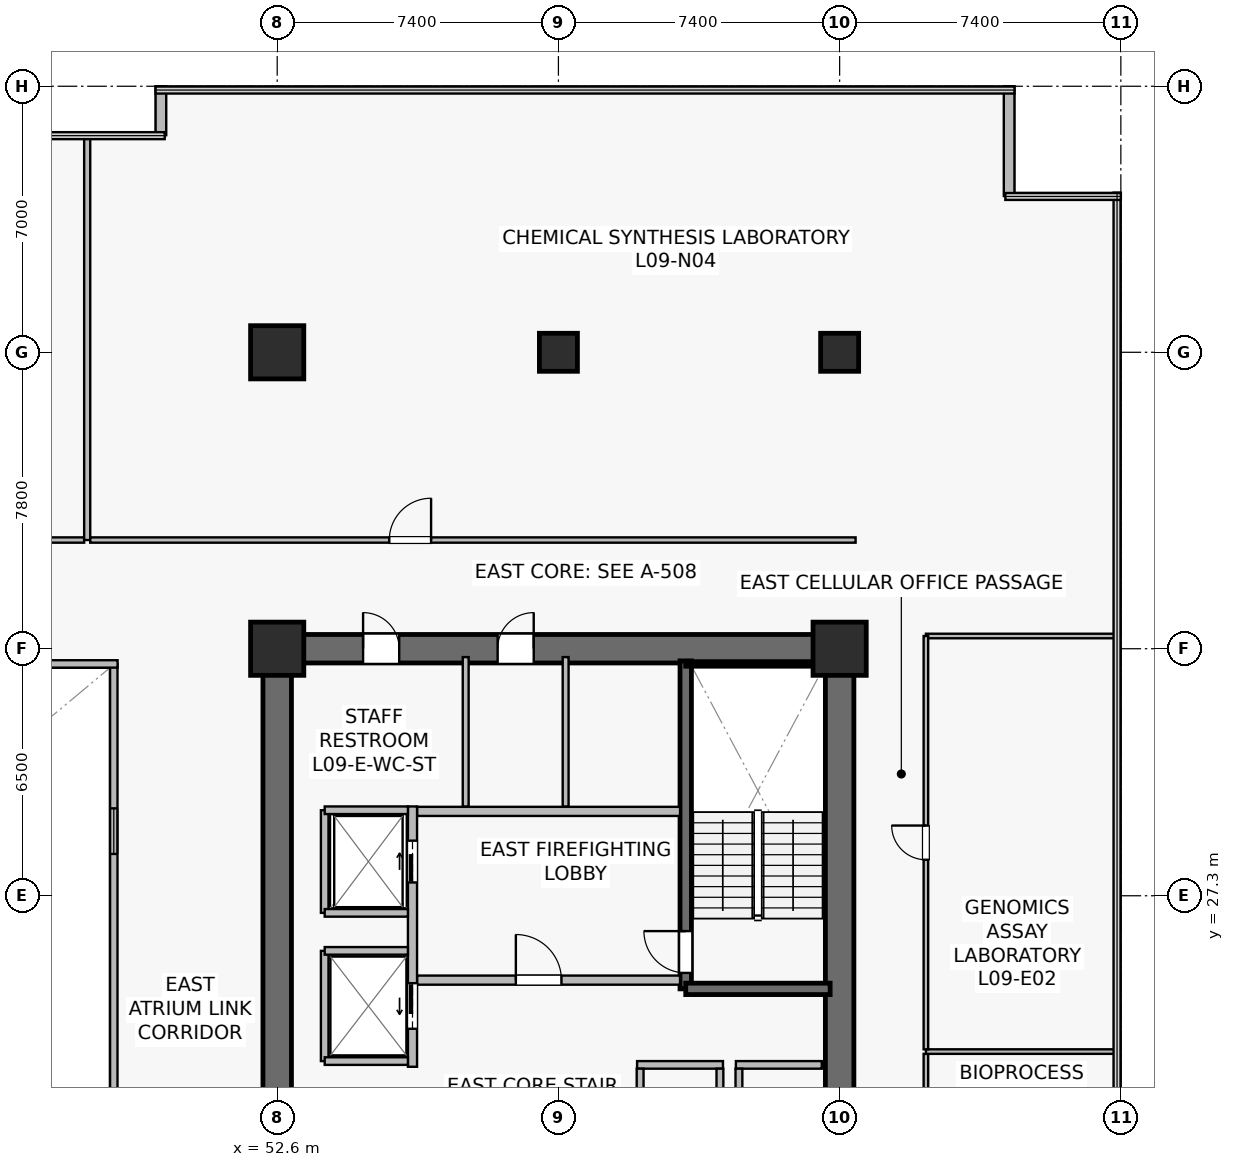
"""IFC4 building model, lengths in metres.
Left out: names, types, materials, properties, quantities, classifications, styles, units other than length and angle.
Written with IfcOpenShell. Run it as: python <this file> out.ifc"""

import sys

from ifc_helpers import new_model, si_unit, direction, frame, frame_2d, origin, origin_2d, place, context, subcontext, project, spatial, rectangle, extrude, source, transform, mapped, element, fill, save


model = new_model("IFC4")
c1 = context("Model", 3, precision=1e-05, world=origin(), true_north=direction((0.0, 1.0)))
c2 = subcontext(c1, "Body", "Model", "MODEL_VIEW")
j1 = project(units=[si_unit("LENGTHUNIT", "METRE"), si_unit("PLANEANGLEUNIT", "RADIAN")], contexts=[c1])
p1 = place(None, origin())
s1 = spatial("IfcSite", under=j1, at=p1, CompositionType="ELEMENT")
p2 = place(p1, origin())
s2 = spatial("IfcBuilding", under=s1, at=p2, CompositionType="ELEMENT")
p3 = place(p2, frame((0.0, 0.0, 37.5)))
s3 = spatial("IfcBuildingStorey", under=s2, at=p3, CompositionType="ELEMENT", Elevation=37.5)
p4 = place(p3, frame((52.225, 33.8, 0.0), z_axis=(0.0, 0.0, 1.0), x_axis=(1.0, 0.0, 0.0)))
e1 = element("IfcWall", 1, at=p4, inside=s3, PredefinedType="SHEAR", context=c2, shape_type="SweptSolid", body=[
    extrude(rectangle(XDim=15.55, YDim=0.75, at=frame_2d((7.775, 0.0))), origin(), (0.0, 0.0, 1.0), 3.78),
])
p5 = place(p4, frame((6.175, 0.0, 0.0)))
e2 = element("IfcOpeningElement", 2, at=p5, cuts=e1, PredefinedType="OPENING", context=c2, shape_type="SweptSolid", body=[
    extrude(rectangle(XDim=0.95, YDim=2.15, at=frame_2d((0.475, 1.075))), frame((0.0, 0.385, 0.0), z_axis=(0.0, -1.0, 0.0), x_axis=(1.0, 0.0, 0.0)), (0.0, 0.0, 1.0), 0.77),
])
p6 = place(p4, frame((2.635, 0.0, 0.0)))
e3 = element("IfcOpeningElement", 3, at=p6, cuts=e1, PredefinedType="OPENING", context=c2, shape_type="SweptSolid", body=[
    extrude(rectangle(XDim=0.95, YDim=2.15, at=frame_2d((0.475, 1.075))), frame((0.0, 0.385, 0.0), z_axis=(0.0, -1.0, 0.0), x_axis=(1.0, 0.0, 0.0)), (0.0, 0.0, 1.0), 0.77),
])
p7 = place(p3, frame((52.6, 15.175, 0.0), z_axis=(0.0, 0.0, 1.0), x_axis=(0.0, 1.0, 0.0)))
e4 = element("IfcWall", 4, at=p7, inside=s3, PredefinedType="SHEAR", context=c2, shape_type="SweptSolid", body=[
    extrude(rectangle(XDim=18.25, YDim=0.75, at=frame_2d((9.125, 0.0))), origin(), (0.0, 0.0, 1.0), 3.78),
])
p8 = place(p7, frame((3.375, 0.0, 0.0)))
e5 = element("IfcOpeningElement", 5, at=p8, cuts=e4, PredefinedType="OPENING", context=c2, shape_type="SweptSolid", body=[
    extrude(rectangle(XDim=1.42, YDim=2.2, at=frame_2d((0.71, 1.1))), frame((0.0, 0.385, 0.0), z_axis=(0.0, -1.0, 0.0), x_axis=(1.0, 0.0, 0.0)), (0.0, 0.0, 1.0), 0.77),
])
p9 = place(p3, frame((67.4, 15.175, 0.0), z_axis=(0.0, 0.0, 1.0), x_axis=(0.0, 1.0, 0.0)))
e6 = element("IfcWall", 6, at=p9, inside=s3, PredefinedType="SHEAR", context=c2, shape_type="SweptSolid", body=[
    extrude(rectangle(XDim=18.25, YDim=0.75, at=frame_2d((9.125, 0.0))), origin(), (0.0, 0.0, 1.0), 3.78),
])
p10 = place(p3, frame((63.35, 24.85, 0.0), z_axis=(0.0, 0.0, 1.0), x_axis=(0.0, 1.0, 0.0)))
e7 = element("IfcWall", 7, at=p10, inside=s3, PredefinedType="SHEAR", context=c2, shape_type="SweptSolid", body=[
    extrude(rectangle(XDim=8.63, YDim=0.3, at=frame_2d((4.315, 0.0))), origin(), (0.0, 0.0, 1.0), 3.78),
])
p11 = place(p10, frame((0.42, 0.0, 0.0)))
e8 = element("IfcOpeningElement", 8, at=p11, cuts=e7, PredefinedType="OPENING", context=c2, shape_type="SweptSolid", body=[
    extrude(rectangle(XDim=1.1, YDim=2.15, at=frame_2d((0.55, 1.075))), frame((0.0, 0.16, 0.0), z_axis=(0.0, -1.0, 0.0), x_axis=(1.0, 0.0, 0.0)), (0.0, 0.0, 1.0), 0.32),
])
p12 = place(p3, frame((63.35, 24.85, 0.0), z_axis=(0.0, 0.0, 1.0), x_axis=(1.0, 0.0, 0.0)))
e9 = element("IfcWall", 9, at=p12, inside=s3, PredefinedType="SHEAR", context=c2, shape_type="SweptSolid", body=[
    extrude(rectangle(XDim=3.8, YDim=0.3, at=frame_2d((1.9, 0.0))), origin(), (0.0, 0.0, 1.0), 3.78),
])
p13 = place(p3, frame((63.35, 33.4, 0.0), z_axis=(0.0, 0.0, 1.0), x_axis=(1.0, 0.0, 0.0)))
e10 = element("IfcWall", 10, at=p13, inside=s3, PredefinedType="SOLIDWALL", context=c2, shape_type="SweptSolid", body=[
    extrude(rectangle(XDim=3.72, YDim=0.12, at=frame_2d((1.86, 0.0))), origin(), (0.0, 0.0, 1.0), 3.78),
])
m1 = source(origin(), c2, "Body", "SweptSolid", [
    extrude(rectangle(XDim=1.4, YDim=1.4, at=origin_2d()), origin(), (0.0, 0.0, 1.0), 4.1),
])
for number, where, z_axis, x_axis in (
    (11, (52.6, 33.8, 0.0), (0.0, 0.0, 1.0), (1.0, 0.0, 0.0)),
    (12, (67.4, 33.8, 0.0), (0.0, 0.0, 1.0), (1.0, 0.0, 0.0)),
    (13, (52.6, 41.6, 0.0), (0.0, 0.0, 1.0), (1.0, 0.0, 0.0)),
):
    element("IfcColumn", number, at=place(p3, frame(where, z_axis=z_axis, x_axis=x_axis)), inside=s3, PredefinedType="COLUMN", context=c2, shape_type="MappedRepresentation", body=[
        mapped(m1, transform((0.0, 0.0, 0.0), scale=1.0)),
    ])
m2 = source(origin(), c2, "Body", "SweptSolid", [
    extrude(rectangle(XDim=1.0, YDim=1.0, at=origin_2d()), origin(), (0.0, 0.0, 1.0), 4.1),
])
for number, where, z_axis, x_axis in (
    (14, (60.0, 41.6, 0.0), (0.0, 0.0, 1.0), (1.0, 0.0, 0.0)),
    (15, (67.4, 41.6, 0.0), (0.0, 0.0, 1.0), (1.0, 0.0, 0.0)),
):
    element("IfcColumn", number, at=place(p3, frame(where, z_axis=z_axis, x_axis=x_axis)), inside=s3, PredefinedType="COLUMN", context=c2, shape_type="MappedRepresentation", body=[
        mapped(m2, transform((0.0, 0.0, 0.0), scale=1.0)),
    ])
p14 = place(p3, frame((71.86, 45.712, 0.0), z_axis=(0.0, 0.0, 1.0), x_axis=(0.0, 1.0, 0.0)))
e16 = element("IfcWall", 16, at=p14, inside=s3, PredefinedType="STANDARD", context=c2, shape_type="SweptSolid", body=[
    extrude(rectangle(XDim=2.888, YDim=0.28, at=frame_2d((1.444, 0.0))), origin(), (0.0, 0.0, 1.0), 3.78),
])
p15 = place(p3, frame((49.54, 48.6, 0.0), z_axis=(0.0, 0.0, 1.0), x_axis=(0.0, -1.0, 0.0)))
e17 = element("IfcWall", 17, at=p15, inside=s3, PredefinedType="STANDARD", context=c2, shape_type="SweptSolid", body=[
    extrude(rectangle(XDim=1.288, YDim=0.28, at=frame_2d((0.644, 0.0))), origin(), (0.0, 0.0, 1.0), 3.78),
])
p16 = place(p3, frame((56.28, 25.08, 0.0), z_axis=(0.0, 0.0, 1.0), x_axis=(1.0, 0.0, 0.0)))
e18 = element("IfcWall", 18, at=p16, inside=s3, PredefinedType="SOLIDWALL", context=c2, shape_type="SweptSolid", body=[
    extrude(rectangle(XDim=6.92, YDim=0.24, at=frame_2d((3.46, 0.0))), origin(), (0.0, 0.0, 1.0), 3.065),
])
p17 = place(p16, frame((2.6, 0.0, 0.0)))
e19 = element("IfcOpeningElement", 19, at=p17, cuts=e18, PredefinedType="OPENING", context=c2, shape_type="SweptSolid", body=[
    extrude(rectangle(XDim=1.2, YDim=2.16, at=frame_2d((0.6, 1.08))), frame((0.0, 0.13, 0.0), z_axis=(0.0, -1.0, 0.0), x_axis=(1.0, 0.0, 0.0)), (0.0, 0.0, 1.0), 0.26),
])
p18 = place(p3, frame((56.28, 29.52, 0.0), z_axis=(0.0, 0.0, 1.0), x_axis=(1.0, 0.0, 0.0)))
e20 = element("IfcWall", 20, at=p18, inside=s3, PredefinedType="SOLIDWALL", context=c2, shape_type="SweptSolid", body=[
    extrude(rectangle(XDim=6.92, YDim=0.24, at=frame_2d((3.46, 0.0))), origin(), (0.0, 0.0, 1.0), 3.065),
])
p19 = place(p3, frame((56.16, 22.8, 0.0), z_axis=(0.0, 0.0, 1.0), x_axis=(0.0, 1.0, 0.0)))
e21 = element("IfcWall", 21, at=p19, inside=s3, PredefinedType="SOLIDWALL", context=c2, shape_type="SweptSolid", body=[
    extrude(rectangle(XDim=6.85, YDim=0.24, at=frame_2d((3.425, 0.0))), origin(), (0.0, 0.0, 1.0), 2.865),
])
p20 = place(p19, frame((4.85, 0.0, 0.0)))
e22 = element("IfcOpeningElement", 22, at=p20, cuts=e21, PredefinedType="OPENING", context=c2, shape_type="SweptSolid", body=[
    extrude(rectangle(XDim=1.1, YDim=2.22, at=frame_2d((0.55, 1.11))), frame((0.0, 0.13, 0.0), z_axis=(0.0, -1.0, 0.0), x_axis=(1.0, 0.0, 0.0)), (0.0, 0.0, 1.0), 0.26),
])
p21 = place(p19, frame((1.0, 0.0, 0.0)))
e23 = element("IfcOpeningElement", 23, at=p21, cuts=e21, PredefinedType="OPENING", context=c2, shape_type="SweptSolid", body=[
    extrude(rectangle(XDim=1.2, YDim=2.22, at=frame_2d((0.6, 1.11))), frame((0.0, 0.13, 0.0), z_axis=(0.0, -1.0, 0.0), x_axis=(1.0, 0.0, 0.0)), (0.0, 0.0, 1.0), 0.26),
])
p22 = place(p3, frame((64.67, 22.85, 0.0), z_axis=(0.0, 0.0, 1.0), x_axis=(1.0, 0.0, 0.0)))
e24 = element("IfcWall", 24, at=p22, inside=s3, PredefinedType="SOLIDWALL", context=c2, shape_type="SweptSolid", body=[
    extrude(rectangle(XDim=2.26, YDim=0.2, at=frame_2d((1.13, 0.0))), origin(), (0.0, 0.0, 1.0), 3.78),
])
p23 = place(p3, frame((64.75, 20.85, 0.0), z_axis=(0.0, 0.0, 1.0), x_axis=(0.0, 1.0, 0.0)))
e25 = element("IfcWall", 25, at=p23, inside=s3, PredefinedType="SOLIDWALL", context=c2, shape_type="SweptSolid", body=[
    extrude(rectangle(XDim=1.9, YDim=0.18, at=frame_2d((0.95, 0.0))), origin(), (0.0, 0.0, 1.0), 3.78),
])
p24 = place(p3, frame((62.07, 22.85, 0.0), z_axis=(0.0, 0.0, 1.0), x_axis=(1.0, 0.0, 0.0)))
e26 = element("IfcWall", 26, at=p24, inside=s3, PredefinedType="SOLIDWALL", context=c2, shape_type="SweptSolid", body=[
    extrude(rectangle(XDim=2.26, YDim=0.2, at=frame_2d((1.13, 0.0))), origin(), (0.0, 0.0, 1.0), 3.78),
])
for number, where, z_axis, x_axis in (
    (27, (62.15, 20.85, 0.0), (0.0, 0.0, 1.0), (0.0, 1.0, 0.0)),
    (28, (64.25, 20.85, 0.0), (0.0, 0.0, 1.0), (0.0, 1.0, 0.0)),
):
    element("IfcWall", number, at=place(p3, frame(where, z_axis=z_axis, x_axis=x_axis)), inside=s3, PredefinedType="SOLIDWALL", context=c2, shape_type="SweptSolid", body=[
        extrude(rectangle(XDim=1.9, YDim=0.18, at=frame_2d((0.95, 0.0))), origin(), (0.0, 0.0, 1.0), 3.78),
    ])
p25 = place(p3, frame((53.85, 26.85, 0.0), z_axis=(0.0, 0.0, 1.0), x_axis=(0.0, 1.0, 0.0)))
e29 = element("IfcWall", 29, at=p25, inside=s3, PredefinedType="SOLIDWALL", context=c2, shape_type="SweptSolid", body=[
    extrude(rectangle(XDim=2.7, YDim=0.2, at=frame_2d((1.35, 0.0))), origin(), (0.0, 0.0, 1.0), 3.78),
])
p26 = place(p3, frame((53.85, 29.55, 0.0), z_axis=(0.0, 0.0, 1.0), x_axis=(1.0, 0.0, 0.0)))
e30 = element("IfcWall", 30, at=p26, inside=s3, PredefinedType="SOLIDWALL", context=c2, shape_type="SweptSolid", body=[
    extrude(rectangle(XDim=2.19, YDim=0.2, at=frame_2d((1.095, 0.0))), origin(), (0.0, 0.0, 1.0), 3.78),
])
p27 = place(p3, frame((53.85, 26.85, 0.0), z_axis=(0.0, 0.0, 1.0), x_axis=(1.0, 0.0, 0.0)))
e31 = element("IfcWall", 31, at=p27, inside=s3, PredefinedType="SOLIDWALL", context=c2, shape_type="SweptSolid", body=[
    extrude(rectangle(XDim=2.19, YDim=0.2, at=frame_2d((1.095, 0.0))), origin(), (0.0, 0.0, 1.0), 3.177),
])
p28 = place(p3, frame((53.85, 22.95, 0.0), z_axis=(0.0, 0.0, 1.0), x_axis=(0.0, 1.0, 0.0)))
e32 = element("IfcWall", 32, at=p28, inside=s3, PredefinedType="SOLIDWALL", context=c2, shape_type="SweptSolid", body=[
    extrude(rectangle(XDim=2.9, YDim=0.2, at=frame_2d((1.45, 0.0))), origin(), (0.0, 0.0, 1.0), 2.865),
])
for number, where, z_axis, x_axis in (
    (33, (53.85, 25.85, 0.0), (0.0, 0.0, 1.0), (1.0, 0.0, 0.0)),
    (34, (53.85, 22.95, 0.0), (0.0, 0.0, 1.0), (1.0, 0.0, 0.0)),
):
    element("IfcWall", number, at=place(p3, frame(where, z_axis=z_axis, x_axis=x_axis)), inside=s3, PredefinedType="SOLIDWALL", context=c2, shape_type="SweptSolid", body=[
        extrude(rectangle(XDim=2.19, YDim=0.2, at=frame_2d((1.095, 0.0))), origin(), (0.0, 0.0, 1.0), 3.78),
    ])
p29 = place(p3, frame((60.19, 29.65, 0.0), z_axis=(0.0, 0.0, 1.0), x_axis=(0.0, 1.0, 0.0)))
e35 = element("IfcWall", 35, at=p29, inside=s3, PredefinedType="PLUMBINGWALL", context=c2, shape_type="SweptSolid", body=[
    extrude(rectangle(XDim=3.93, YDim=0.155, at=frame_2d((1.965, 0.0))), origin(), (0.0, 0.0, 1.0), 3.065),
])
p30 = place(p3, frame((57.56, 29.65, 0.0), z_axis=(0.0, 0.0, 1.0), x_axis=(0.0, 1.0, 0.0)))
e36 = element("IfcWall", 36, at=p30, inside=s3, PredefinedType="PLUMBINGWALL", context=c2, shape_type="SweptSolid", body=[
    extrude(rectangle(XDim=3.93, YDim=0.155, at=frame_2d((1.965, 0.0))), origin(), (0.0, 0.0, 1.0), 3.78),
])
p31 = place(p3, frame((48.3, 15.2, 0.0), z_axis=(0.0, 0.0, 1.0), x_axis=(0.0, 1.0, 0.0)))
e37 = element("IfcWall", 37, at=p31, inside=s3, PredefinedType="SOLIDWALL", context=c2, shape_type="SweptSolid", body=[
    extrude(rectangle(XDim=18.2, YDim=0.195, at=frame_2d((9.1, 0.0))), origin(), (0.0, 0.0, 1.0), 3.78),
])
p32 = place(p31, frame((1.8, 0.0, 0.9)))
e38 = element("IfcOpeningElement", 38, at=p32, cuts=e37, PredefinedType="OPENING", context=c2, shape_type="SweptSolid", body=[
    extrude(rectangle(XDim=1.2, YDim=1.35, at=frame_2d((0.6, 0.675))), frame((0.0, 0.107, 0.0), z_axis=(0.0, -1.0, 0.0), x_axis=(1.0, 0.0, 0.0)), (0.0, 0.0, 1.0), 0.215),
])
p33 = place(p31, frame((13.2, 0.0, 0.9)))
e39 = element("IfcOpeningElement", 39, at=p33, cuts=e37, PredefinedType="OPENING", context=c2, shape_type="SweptSolid", body=[
    extrude(rectangle(XDim=1.2, YDim=1.35, at=frame_2d((0.6, 0.675))), frame((0.0, 0.107, 0.0), z_axis=(0.0, -1.0, 0.0), x_axis=(1.0, 0.0, 0.0)), (0.0, 0.0, 1.0), 0.215),
])
p34 = place(p3, frame((26.4, 33.4, 0.0), z_axis=(0.0, 0.0, 1.0), x_axis=(1.0, 0.0, 0.0)))
e40 = element("IfcWall", 40, at=p34, inside=s3, PredefinedType="SOLIDWALL", context=c2, shape_type="SweptSolid", body=[
    extrude(rectangle(XDim=22.0, YDim=0.195, at=frame_2d((11.0, 0.0))), origin(), (0.0, 0.0, 1.0), 3.78),
])
p35 = place(p3, frame((30.88, 36.66, 0.0), z_axis=(0.0, 0.0, 1.0), x_axis=(1.0, 0.0, 0.0)))
e41 = element("IfcWall", 41, at=p35, inside=s3, PredefinedType="PARTITIONING", context=c2, shape_type="SweptSolid", body=[
    extrude(rectangle(XDim=16.64, YDim=0.14, at=frame_2d((8.32, 0.0))), origin(), (0.0, 0.0, 1.0), 3.065),
])
p36 = place(p35, frame((8.215, 0.0, 0.0)))
e42 = element("IfcOpeningElement", 42, at=p36, cuts=e41, PredefinedType="OPENING", context=c2, shape_type="SweptSolid", body=[
    extrude(rectangle(XDim=1.1, YDim=2.18, at=frame_2d((0.55, 1.09))), frame((0.0, 0.08, 0.0), z_axis=(0.0, -1.0, 0.0), x_axis=(1.0, 0.0, 0.0)), (0.0, 0.0, 1.0), 0.16),
])
p37 = place(p3, frame((47.6, 36.66, 0.0), z_axis=(0.0, 0.0, 1.0), x_axis=(0.0, 1.0, 0.0)))
e43 = element("IfcWall", 43, at=p37, inside=s3, PredefinedType="PARTITIONING", context=c2, shape_type="SweptSolid", body=[
    extrude(rectangle(XDim=10.63, YDim=0.16, at=frame_2d((5.315, 0.0))), origin(), (0.0, 0.0, 1.0), 3.015),
])
p38 = place(p3, frame((47.68, 36.66, 0.0), z_axis=(0.0, 0.0, 1.0), x_axis=(1.0, 0.0, 0.0)))
e44 = element("IfcWall", 44, at=p38, inside=s3, PredefinedType="PARTITIONING", context=c2, shape_type="SweptSolid", body=[
    extrude(rectangle(XDim=20.14, YDim=0.14, at=frame_2d((10.07, 0.0))), origin(), (0.0, 0.0, 1.0), 3.065),
])
p39 = place(p38, frame((7.869, 0.0, 0.0)))
e45 = element("IfcOpeningElement", 45, at=p39, cuts=e44, PredefinedType="OPENING", context=c2, shape_type="SweptSolid", body=[
    extrude(rectangle(XDim=1.1, YDim=2.18, at=frame_2d((0.55, 1.09))), frame((0.0, 0.08, 0.0), z_axis=(0.0, -1.0, 0.0), x_axis=(1.0, 0.0, 0.0)), (0.0, 0.0, 1.0), 0.16),
])
p40 = place(p3, frame((69.67, 34.135, 0.0), z_axis=(0.0, 0.0, 1.0), x_axis=(1.0, 0.0, 0.0)))
e46 = element("IfcWall", 46, at=p40, inside=s3, PredefinedType="PARTITIONING", context=c2, shape_type="SweptSolid", body=[
    extrude(rectangle(XDim=5.02, YDim=0.12, at=frame_2d((2.51, 0.0))), origin(), (0.0, 0.0, 1.0), 3.78),
])
p41 = place(p3, frame((69.67, 14.465, 0.0), z_axis=(0.0, 0.0, 1.0), x_axis=(0.0, 1.0, 0.0)))
e47 = element("IfcWall", 47, at=p41, inside=s3, PredefinedType="PARTITIONING", context=c2, shape_type="SweptSolid", body=[
    extrude(rectangle(XDim=8.675, YDim=0.12, at=frame_2d((4.337, 0.0))), origin(), (0.0, 0.0, 1.0), 3.78),
])
p42 = place(p41, frame((3.887, 0.0, 0.0)))
e48 = element("IfcOpeningElement", 48, at=p42, cuts=e47, PredefinedType="OPENING", context=c2, shape_type="SweptSolid", body=[
    extrude(rectangle(XDim=0.9, YDim=2.1, at=frame_2d((0.45, 1.05))), frame((0.0, 0.07, 0.0), z_axis=(0.0, -1.0, 0.0), x_axis=(1.0, 0.0, 0.0)), (0.0, 0.0, 1.0), 0.14),
])
p43 = place(p3, frame((69.67, 23.2, 0.0), z_axis=(0.0, 0.0, 1.0), x_axis=(1.0, 0.0, 0.0)))
e49 = element("IfcWall", 49, at=p43, inside=s3, PredefinedType="PARTITIONING", context=c2, shape_type="SweptSolid", body=[
    extrude(rectangle(XDim=5.02, YDim=0.12, at=frame_2d((2.51, 0.0))), origin(), (0.0, 0.0, 1.0), 3.78),
])
p44 = place(p3, frame((69.67, 23.26, 0.0), z_axis=(0.0, 0.0, 1.0), x_axis=(0.0, 1.0, 0.0)))
e50 = element("IfcWall", 50, at=p44, inside=s3, PredefinedType="PARTITIONING", context=c2, shape_type="SweptSolid", body=[
    extrude(rectangle(XDim=10.875, YDim=0.12, at=frame_2d((5.438, 0.0))), origin(), (0.0, 0.0, 1.0), 3.78),
])
p45 = place(p44, frame((4.988, 0.0, 0.0)))
e51 = element("IfcOpeningElement", 51, at=p45, cuts=e50, PredefinedType="OPENING", context=c2, shape_type="SweptSolid", body=[
    extrude(rectangle(XDim=0.9, YDim=2.1, at=frame_2d((0.45, 1.05))), frame((0.0, 0.07, 0.0), z_axis=(0.0, -1.0, 0.0), x_axis=(1.0, 0.0, 0.0)), (0.0, 0.0, 1.0), 0.14),
])
m3 = source(origin(), c2, "Body", "SweptSolid", [
    extrude(rectangle(XDim=1.2, YDim=1.35, at=frame_2d((0.6, 0.675))), frame((0.0, 0.03, 0.0), z_axis=(0.0, -1.0, 0.0), x_axis=(1.0, 0.0, 0.0)), (0.0, 0.0, 1.0), 0.06),
])
p46 = place(p33, origin())
e52 = element("IfcWindow", 52, at=p46, inside=s3, PartitioningType="SINGLE_PANEL", PredefinedType="WINDOW", context=c2, shape_type="MappedRepresentation", body=[
    mapped(m3, transform((0.0, 0.0, 0.0), scale=1.0)),
])
fill(e39, e52)
m4 = source(origin(), c2, "Body", "SweptSolid", [
    extrude(rectangle(XDim=1.1, YDim=2.15, at=frame_2d((0.55, 1.075))), frame((0.0, 0.025, 0.0), z_axis=(0.0, -1.0, 0.0), x_axis=(1.0, 0.0, 0.0)), (0.0, 0.0, 1.0), 0.05),
])
p47 = place(p11, origin())
e53 = element("IfcDoor", 53, at=p47, inside=s3, OperationType="SINGLE_SWING_RIGHT", PredefinedType="DOOR", context=c2, shape_type="MappedRepresentation", body=[
    mapped(m4, transform((0.0, 0.0, 0.0), scale=1.0)),
])
fill(e8, e53)
m5 = source(origin(), c2, "Body", "SweptSolid", [
    extrude(rectangle(XDim=1.2, YDim=2.16, at=frame_2d((0.6, 1.08))), frame((0.0, 0.025, 0.0), z_axis=(0.0, -1.0, 0.0), x_axis=(1.0, 0.0, 0.0)), (0.0, 0.0, 1.0), 0.05),
])
p48 = place(p17, origin())
e54 = element("IfcDoor", 54, at=p48, inside=s3, OperationType="SINGLE_SWING_LEFT", PredefinedType="DOOR", context=c2, shape_type="MappedRepresentation", body=[
    mapped(m5, transform((0.0, 0.0, 0.0), scale=1.0)),
])
fill(e19, e54)
m6 = source(origin(), c2, "Body", "SweptSolid", [
    extrude(rectangle(XDim=1.1, YDim=2.22, at=frame_2d((0.55, 1.11))), frame((0.0, 0.025, 0.0), z_axis=(0.0, -1.0, 0.0), x_axis=(1.0, 0.0, 0.0)), (0.0, 0.0, 1.0), 0.05),
])
p49 = place(p20, origin())
e55 = element("IfcDoor", 55, at=p49, inside=s3, OperationType="SLIDING_TO_RIGHT", PredefinedType="USERDEFINED", context=c2, shape_type="MappedRepresentation", body=[
    mapped(m6, transform((0.0, 0.0, 0.0), scale=1.0)),
])
fill(e22, e55)
m7 = source(origin(), c2, "Body", "SweptSolid", [
    extrude(rectangle(XDim=1.2, YDim=2.22, at=frame_2d((0.6, 1.11))), frame((0.0, 0.025, 0.0), z_axis=(0.0, -1.0, 0.0), x_axis=(1.0, 0.0, 0.0)), (0.0, 0.0, 1.0), 0.05),
])
p50 = place(p21, origin())
e56 = element("IfcDoor", 56, at=p50, inside=s3, OperationType="SLIDING_TO_LEFT", PredefinedType="USERDEFINED", context=c2, shape_type="MappedRepresentation", body=[
    mapped(m7, transform((0.0, 0.0, 0.0), scale=1.0)),
])
fill(e23, e56)
m8 = source(origin(), c2, "Body", "SweptSolid", [
    extrude(rectangle(XDim=0.95, YDim=2.15, at=frame_2d((0.475, 1.075))), frame((0.0, 0.025, 0.0), z_axis=(0.0, -1.0, 0.0), x_axis=(1.0, 0.0, 0.0)), (0.0, 0.0, 1.0), 0.05),
])
p51 = place(p5, origin())
e57 = element("IfcDoor", 57, at=p51, inside=s3, OperationType="SINGLE_SWING_RIGHT", PredefinedType="DOOR", context=c2, shape_type="MappedRepresentation", body=[
    mapped(m8, transform((0.0, 0.0, 0.0), scale=1.0)),
])
fill(e2, e57)
p52 = place(p6, origin())
e58 = element("IfcDoor", 58, at=p52, inside=s3, OperationType="SINGLE_SWING_LEFT", PredefinedType="DOOR", context=c2, shape_type="MappedRepresentation", body=[
    mapped(m8, transform((0.0, 0.0, 0.0), scale=1.0)),
])
fill(e3, e58)
m9 = source(origin(), c2, "Body", "SweptSolid", [
    extrude(rectangle(XDim=1.1, YDim=2.18, at=frame_2d((0.55, 1.09))), frame((0.0, 0.025, 0.0), z_axis=(0.0, -1.0, 0.0), x_axis=(1.0, 0.0, 0.0)), (0.0, 0.0, 1.0), 0.05),
])
p53 = place(p39, origin())
e59 = element("IfcDoor", 59, at=p53, inside=s3, OperationType="SINGLE_SWING_RIGHT", PredefinedType="DOOR", context=c2, shape_type="MappedRepresentation", body=[
    mapped(m9, transform((0.0, 0.0, 0.0), scale=1.0)),
])
fill(e45, e59)
m10 = source(origin(), c2, "Body", "SweptSolid", [
    extrude(rectangle(XDim=0.9, YDim=2.1, at=frame_2d((0.45, 1.05))), frame((0.0, 0.025, 0.0), z_axis=(0.0, -1.0, 0.0), x_axis=(1.0, 0.0, 0.0)), (0.0, 0.0, 1.0), 0.05),
])
p54 = place(p45, origin())
e60 = element("IfcDoor", 60, at=p54, inside=s3, OperationType="SINGLE_SWING_RIGHT", PredefinedType="DOOR", context=c2, shape_type="MappedRepresentation", body=[
    mapped(m10, transform((0.0, 0.0, 0.0), scale=1.0)),
])
fill(e51, e60)
save(model, sys.argv[1])
